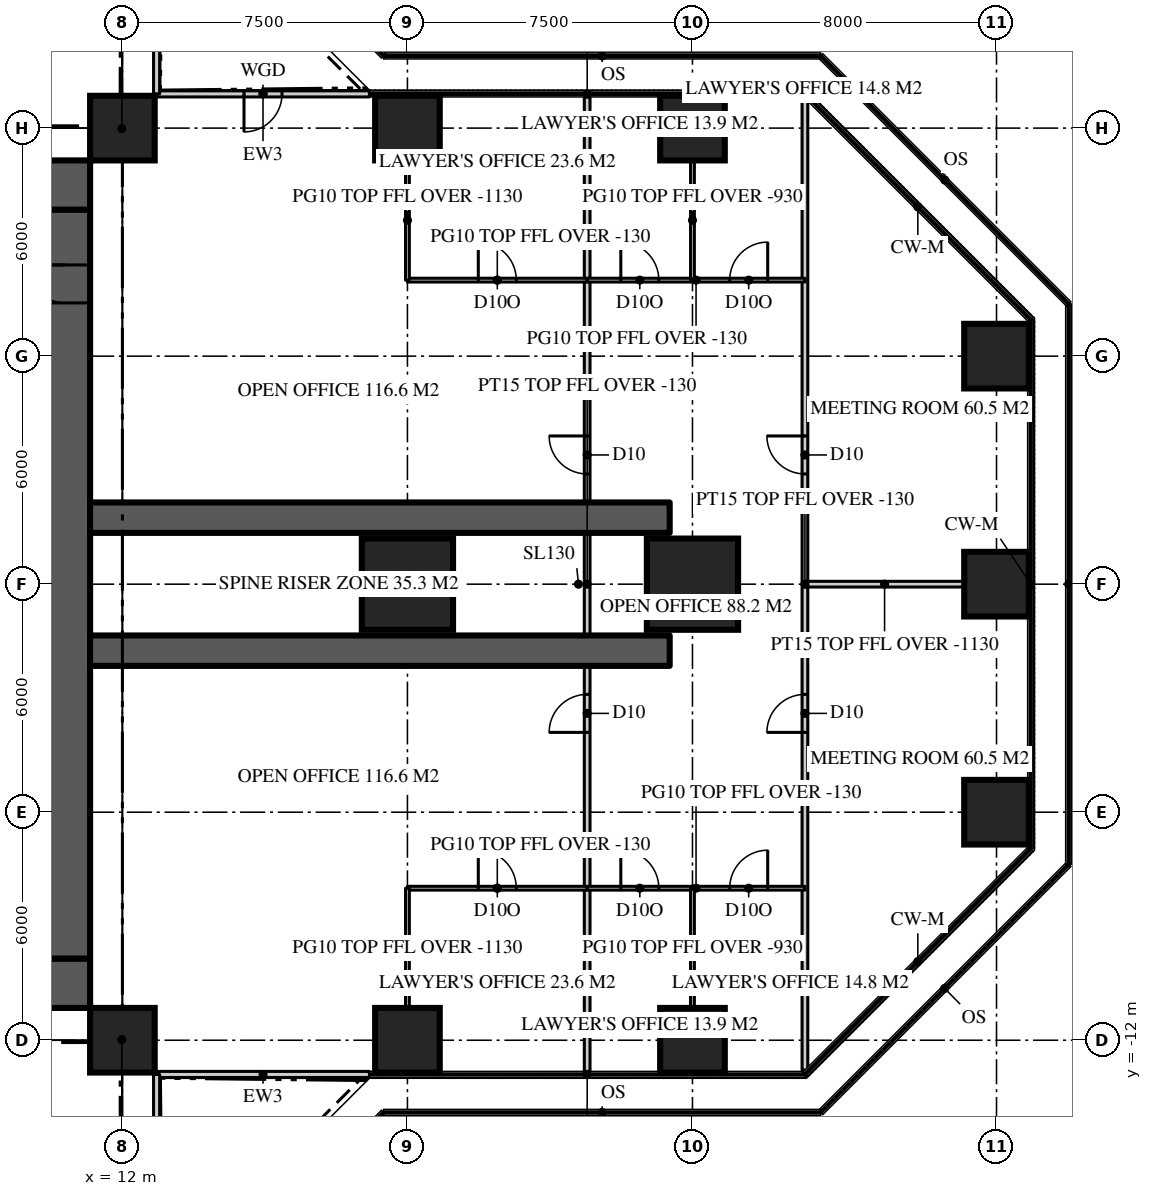
"""IFC4 building model, lengths in metres.
Left out: names, types, materials, properties, quantities, classifications, styles, units other than length and angle.
Written with IfcOpenShell. Run it as: python <this file> out.ifc"""

import sys

from ifc_helpers import new_model, si_unit, direction, frame, frame_2d, origin, origin_2d, place, context, subcontext, project, spatial, rectangle, extrude, element, fill, save


model = new_model("IFC4")
c1 = context("Model", 3, precision=1e-05, world=origin(), true_north=direction((0.0, 1.0)))
c2 = subcontext(c1, "Body", "Model", "MODEL_VIEW")
j1 = project(units=[si_unit("LENGTHUNIT", "METRE"), si_unit("PLANEANGLEUNIT", "RADIAN")], contexts=[c1])
p1 = place(None, origin())
s1 = spatial("IfcSite", under=j1, at=p1, CompositionType="ELEMENT")
p2 = place(p1, origin())
s2 = spatial("IfcBuilding", under=s1, at=p2, CompositionType="ELEMENT")
p3 = place(p2, frame((0.0, 0.0, 135.9)))
s3 = spatial("IfcBuildingStorey", under=s2, at=p3, CompositionType="ELEMENT", Elevation=135.9)
p4 = place(p3, frame((-11.15, 10.5, 0.0), z_axis=(0.0, 0.0, 1.0), x_axis=(1.0, 0.0, 0.0)))
e1 = element("IfcWall", 1, at=p4, inside=s3, PredefinedType="SHEAR", context=c2, shape_type="SweptSolid", body=[
    extrude(rectangle(XDim=22.3, YDim=1.3, at=frame_2d((11.15, 0.0))), origin(), (0.0, 0.0, 1.0), 3.9),
])
p5 = place(p4, frame((4.25, 0.0, 0.0)))
e2 = element("IfcOpeningElement", 2, at=p5, cuts=e1, PredefinedType="OPENING", context=c2, shape_type="SweptSolid", body=[
    extrude(rectangle(XDim=1.8, YDim=2.2, at=frame_2d((0.9, 1.1))), frame((0.0, 0.66, 0.0), z_axis=(0.0, -1.0, 0.0), x_axis=(1.0, 0.0, 0.0)), (0.0, 0.0, 1.0), 1.32),
])
p6 = place(p4, frame((16.25, 0.0, 0.0)))
e3 = element("IfcOpeningElement", 3, at=p6, cuts=e1, PredefinedType="OPENING", context=c2, shape_type="SweptSolid", body=[
    extrude(rectangle(XDim=1.8, YDim=2.2, at=frame_2d((0.9, 1.1))), frame((0.0, 0.66, 0.0), z_axis=(0.0, -1.0, 0.0), x_axis=(1.0, 0.0, 0.0)), (0.0, 0.0, 1.0), 1.32),
])
p7 = place(p3, frame((11.15, -10.5, 0.0), z_axis=(0.0, 0.0, 1.0), x_axis=(-1.0, 0.0, 0.0)))
e4 = element("IfcWall", 4, at=p7, inside=s3, PredefinedType="SHEAR", context=c2, shape_type="SweptSolid", body=[
    extrude(rectangle(XDim=22.3, YDim=1.3, at=frame_2d((11.15, 0.0))), origin(), (0.0, 0.0, 1.0), 3.9),
])
p8 = place(p7, frame((16.25, 0.0, 0.0)))
e5 = element("IfcOpeningElement", 5, at=p8, cuts=e4, PredefinedType="OPENING", context=c2, shape_type="SweptSolid", body=[
    extrude(rectangle(XDim=1.8, YDim=2.2, at=frame_2d((0.9, 1.1))), frame((0.0, 0.66, 0.0), z_axis=(0.0, -1.0, 0.0), x_axis=(1.0, 0.0, 0.0)), (0.0, 0.0, 1.0), 1.32),
])
p9 = place(p7, frame((4.25, 0.0, 0.0)))
e6 = element("IfcOpeningElement", 6, at=p9, cuts=e4, PredefinedType="OPENING", context=c2, shape_type="SweptSolid", body=[
    extrude(rectangle(XDim=1.8, YDim=2.2, at=frame_2d((0.9, 1.1))), frame((0.0, 0.66, 0.0), z_axis=(0.0, -1.0, 0.0), x_axis=(1.0, 0.0, 0.0)), (0.0, 0.0, 1.0), 1.32),
])
p10 = place(p3, frame((10.5, -9.85, 0.0), z_axis=(0.0, 0.0, 1.0), x_axis=(0.0, 1.0, 0.0)))
e7 = element("IfcWall", 7, at=p10, inside=s3, PredefinedType="SHEAR", context=c2, shape_type="SweptSolid", body=[
    extrude(rectangle(XDim=19.7, YDim=1.3, at=frame_2d((9.85, 0.0))), origin(), (0.0, 0.0, 1.0), 3.9),
])
p11 = place(p10, frame((17.25, 0.0, 0.0)))
e8 = element("IfcOpeningElement", 8, at=p11, cuts=e7, PredefinedType="OPENING", context=c2, shape_type="SweptSolid", body=[
    extrude(rectangle(XDim=1.0, YDim=2.2, at=frame_2d((0.5, 1.1))), frame((0.0, 0.66, 0.0), z_axis=(0.0, -1.0, 0.0), x_axis=(1.0, 0.0, 0.0)), (0.0, 0.0, 1.0), 1.32),
])
for number, where, z_axis, x_axis in (
    (9, (11.15, -1.75, 0.0), (0.0, 0.0, 1.0), (1.0, 0.0, 0.0)),
    (10, (11.15, 1.75, 0.0), (0.0, 0.0, 1.0), (1.0, 0.0, 0.0)),
):
    element("IfcWall", number, at=place(p3, frame(where, z_axis=z_axis, x_axis=x_axis)), inside=s3, PredefinedType="SHEAR", context=c2, shape_type="SweptSolid", body=[
        extrude(rectangle(XDim=15.25, YDim=0.8, at=frame_2d((7.625, 0.0))), origin(), (0.0, 0.0, 1.0), 3.9),
    ])
for number, where, z_axis, x_axis in (
    (11, (12.0, -12.0, 0.0), (0.0, 0.0, 1.0), (1.0, 0.0, 0.0)),
    (12, (19.5, -12.0, 0.0), (0.0, 0.0, 1.0), (1.0, 0.0, 0.0)),
    (13, (27.0, -12.0, 0.0), (0.0, 0.0, 1.0), (1.0, 0.0, 0.0)),
    (14, (35.0, -6.0, 0.0), (0.0, 0.0, 1.0), (1.0, 0.0, 0.0)),
):
    element("IfcColumn", number, at=place(p3, frame(where, z_axis=z_axis, x_axis=x_axis)), inside=s3, PredefinedType="COLUMN", context=c2, shape_type="SweptSolid", body=[
        extrude(rectangle(XDim=1.7, YDim=1.7, at=origin_2d()), origin(), (0.0, 0.0, 1.0), 3.9),
    ])
for number, where, z_axis, x_axis in (
    (15, (19.5, 0.0, 0.0), (0.0, 0.0, 1.0), (1.0, 0.0, 0.0)),
    (16, (27.0, 0.0, 0.0), (0.0, 0.0, 1.0), (1.0, 0.0, 0.0)),
):
    element("IfcColumn", number, at=place(p3, frame(where, z_axis=z_axis, x_axis=x_axis)), inside=s3, PredefinedType="COLUMN", context=c2, shape_type="SweptSolid", body=[
        extrude(rectangle(XDim=2.4, YDim=2.4, at=origin_2d()), origin(), (0.0, 0.0, 1.0), 3.9),
    ])
for number, where, z_axis, x_axis in (
    (17, (35.0, 0.0, 0.0), (0.0, 0.0, 1.0), (1.0, 0.0, 0.0)),
    (18, (35.0, 6.0, 0.0), (0.0, 0.0, 1.0), (1.0, 0.0, 0.0)),
    (19, (12.0, 12.0, 0.0), (0.0, 0.0, 1.0), (1.0, 0.0, 0.0)),
    (20, (19.5, 12.0, 0.0), (0.0, 0.0, 1.0), (1.0, 0.0, 0.0)),
    (21, (27.0, 12.0, 0.0), (0.0, 0.0, 1.0), (1.0, 0.0, 0.0)),
):
    element("IfcColumn", number, at=place(p3, frame(where, z_axis=z_axis, x_axis=x_axis)), inside=s3, PredefinedType="COLUMN", context=c2, shape_type="SweptSolid", body=[
        extrude(rectangle(XDim=1.7, YDim=1.7, at=origin_2d()), origin(), (0.0, 0.0, 1.0), 3.9),
    ])
p12 = place(p3, frame((12.9, -12.9, 0.0), z_axis=(0.0, 0.0, 1.0), x_axis=(1.0, 0.0, 0.0)))
e22 = element("IfcWall", 22, at=p12, inside=s3, PredefinedType="SOLIDWALL", context=c2, shape_type="SweptSolid", body=[
    extrude(rectangle(XDim=5.6, YDim=0.16, at=frame_2d((2.8, 0.0))), origin(), (0.0, 0.0, 1.0), 3.77),
])
p13 = place(p3, frame((18.5, 12.9, 0.0), z_axis=(0.0, 0.0, 1.0), x_axis=(-1.0, 0.0, 0.0)))
e23 = element("IfcWall", 23, at=p13, inside=s3, PredefinedType="SOLIDWALL", context=c2, shape_type="SweptSolid", body=[
    extrude(rectangle(XDim=5.6, YDim=0.16, at=frame_2d((2.8, 0.0))), origin(), (0.0, 0.0, 1.0), 3.77),
])
p14 = place(p13, frame((2.3, 0.0, 0.0)))
e24 = element("IfcOpeningElement", 24, at=p14, cuts=e23, PredefinedType="OPENING", context=c2, shape_type="SweptSolid", body=[
    extrude(rectangle(XDim=1.0, YDim=2.2, at=frame_2d((0.5, 1.1))), frame((0.0, 0.09, 0.0), z_axis=(0.0, -1.0, 0.0), x_axis=(1.0, 0.0, 0.0)), (0.0, 0.0, 1.0), 0.18),
])
p15 = place(p3, frame((12.9, 12.9, 0.0), z_axis=(0.0, 0.0, 1.0), x_axis=(0.0, 1.0, 0.0)))
e25 = element("IfcWall", 25, at=p15, inside=s3, PredefinedType="SOLIDWALL", context=c2, shape_type="SweptSolid", body=[
    extrude(rectangle(XDim=5.6, YDim=0.16, at=frame_2d((2.8, 0.0))), origin(), (0.0, 0.0, 1.0), 3.77),
])
p16 = place(p3, frame((12.9, -18.5, 0.0), z_axis=(0.0, 0.0, 1.0), x_axis=(0.0, 1.0, 0.0)))
e26 = element("IfcWall", 26, at=p16, inside=s3, PredefinedType="SOLIDWALL", context=c2, shape_type="SweptSolid", body=[
    extrude(rectangle(XDim=5.6, YDim=0.16, at=frame_2d((2.8, 0.0))), origin(), (0.0, 0.0, 1.0), 3.77),
])
p17 = place(p16, frame((2.3, 0.0, 0.0)))
e27 = element("IfcOpeningElement", 27, at=p17, cuts=e26, PredefinedType="OPENING", context=c2, shape_type="SweptSolid", body=[
    extrude(rectangle(XDim=1.0, YDim=2.2, at=frame_2d((0.5, 1.1))), frame((0.0, 0.09, 0.0), z_axis=(0.0, -1.0, 0.0), x_axis=(1.0, 0.0, 0.0)), (0.0, 0.0, 1.0), 0.18),
])
p18 = place(p3, frame((24.229, -12.82, 0.0), z_axis=(0.0, 0.0, 1.0), x_axis=(0.0, 1.0, 0.0)))
e28 = element("IfcWall", 28, at=p18, inside=s3, PredefinedType="PARTITIONING", context=c2, shape_type="SweptSolid", body=[
    extrude(rectangle(XDim=25.64, YDim=0.15, at=frame_2d((12.82, 0.0))), origin(), (0.0, 0.0, 1.0), 3.77),
])
p19 = place(p18, frame((15.72, 0.0, 0.0)))
e29 = element("IfcOpeningElement", 29, at=p19, cuts=e28, PredefinedType="OPENING", context=c2, shape_type="SweptSolid", body=[
    extrude(rectangle(XDim=1.0, YDim=2.2, at=frame_2d((0.5, 1.1))), frame((0.0, 0.085, 0.0), z_axis=(0.0, -1.0, 0.0), x_axis=(1.0, 0.0, 0.0)), (0.0, 0.0, 1.0), 0.17),
])
p20 = place(p18, frame((8.92, 0.0, 0.0)))
e30 = element("IfcOpeningElement", 30, at=p20, cuts=e28, PredefinedType="OPENING", context=c2, shape_type="SweptSolid", body=[
    extrude(rectangle(XDim=1.0, YDim=2.2, at=frame_2d((0.5, 1.1))), frame((0.0, 0.085, 0.0), z_axis=(0.0, -1.0, 0.0), x_axis=(1.0, 0.0, 0.0)), (0.0, 0.0, 1.0), 0.17),
])
p21 = place(p3, frame((29.959, -12.786, 0.0), z_axis=(0.0, 0.0, 1.0), x_axis=(0.0, 1.0, 0.0)))
e31 = element("IfcWall", 31, at=p21, inside=s3, PredefinedType="PARTITIONING", context=c2, shape_type="SweptSolid", body=[
    extrude(rectangle(XDim=25.573, YDim=0.15, at=frame_2d((12.786, 0.0))), origin(), (0.0, 0.0, 1.0), 3.77),
])
p22 = place(p21, frame((15.687, 0.0, 0.0)))
e32 = element("IfcOpeningElement", 32, at=p22, cuts=e31, PredefinedType="OPENING", context=c2, shape_type="SweptSolid", body=[
    extrude(rectangle(XDim=1.0, YDim=2.2, at=frame_2d((0.5, 1.1))), frame((0.0, 0.085, 0.0), z_axis=(0.0, -1.0, 0.0), x_axis=(1.0, 0.0, 0.0)), (0.0, 0.0, 1.0), 0.17),
])
p23 = place(p21, frame((8.886, 0.0, 0.0)))
e33 = element("IfcOpeningElement", 33, at=p23, cuts=e31, PredefinedType="OPENING", context=c2, shape_type="SweptSolid", body=[
    extrude(rectangle(XDim=1.0, YDim=2.2, at=frame_2d((0.5, 1.1))), frame((0.0, 0.085, 0.0), z_axis=(0.0, -1.0, 0.0), x_axis=(1.0, 0.0, 0.0)), (0.0, 0.0, 1.0), 0.17),
])
p24 = place(p3, frame((29.959, 0.0, 0.0), z_axis=(0.0, 0.0, 1.0), x_axis=(1.0, 0.0, 0.0)))
e34 = element("IfcWall", 34, at=p24, inside=s3, PredefinedType="PARTITIONING", context=c2, shape_type="SweptSolid", body=[
    extrude(rectangle(XDim=4.191, YDim=0.15, at=frame_2d((2.095, 0.0))), origin(), (0.0, 0.0, 1.0), 2.77),
])
p25 = place(p3, frame((19.5, 8.0, 0.0), z_axis=(0.0, 0.0, 1.0), x_axis=(1.0, 0.0, 0.0)))
e35 = element("IfcWall", 35, at=p25, inside=s3, PredefinedType="PARTITIONING", context=c2, shape_type="SweptSolid", body=[
    extrude(rectangle(XDim=4.729, YDim=0.1, at=frame_2d((2.365, 0.0))), origin(), (0.0, 0.0, 1.0), 3.77),
])
p26 = place(p25, frame((1.865, 0.0, 0.0)))
e36 = element("IfcOpeningElement", 36, at=p26, cuts=e35, PredefinedType="OPENING", context=c2, shape_type="SweptSolid", body=[
    extrude(rectangle(XDim=1.0, YDim=2.2, at=frame_2d((0.5, 1.1))), frame((0.0, 0.06, 0.0), z_axis=(0.0, -1.0, 0.0), x_axis=(1.0, 0.0, 0.0)), (0.0, 0.0, 1.0), 0.12),
])
p27 = place(p3, frame((24.229, 8.0, 0.0), z_axis=(0.0, 0.0, 1.0), x_axis=(1.0, 0.0, 0.0)))
e37 = element("IfcWall", 37, at=p27, inside=s3, PredefinedType="PARTITIONING", context=c2, shape_type="SweptSolid", body=[
    extrude(rectangle(XDim=5.73, YDim=0.1, at=frame_2d((2.865, 0.0))), origin(), (0.0, 0.0, 1.0), 3.77),
])
p28 = place(p27, frame((0.885, 0.0, 0.0)))
e38 = element("IfcOpeningElement", 38, at=p28, cuts=e37, PredefinedType="OPENING", context=c2, shape_type="SweptSolid", body=[
    extrude(rectangle(XDim=1.0, YDim=2.2, at=frame_2d((0.5, 1.1))), frame((0.0, 0.06, 0.0), z_axis=(0.0, -1.0, 0.0), x_axis=(1.0, 0.0, 0.0)), (0.0, 0.0, 1.0), 0.12),
])
p29 = place(p27, frame((3.75, 0.0, 0.0)))
e39 = element("IfcOpeningElement", 39, at=p29, cuts=e37, PredefinedType="OPENING", context=c2, shape_type="SweptSolid", body=[
    extrude(rectangle(XDim=1.0, YDim=2.2, at=frame_2d((0.5, 1.1))), frame((0.0, 0.06, 0.0), z_axis=(0.0, -1.0, 0.0), x_axis=(1.0, 0.0, 0.0)), (0.0, 0.0, 1.0), 0.12),
])
p30 = place(p3, frame((19.5, 8.0, 0.0), z_axis=(0.0, 0.0, 1.0), x_axis=(0.0, 1.0, 0.0)))
e40 = element("IfcWall", 40, at=p30, inside=s3, PredefinedType="PARTITIONING", context=c2, shape_type="SweptSolid", body=[
    extrude(rectangle(XDim=3.15, YDim=0.1, at=frame_2d((1.575, 0.0))), origin(), (0.0, 0.0, 1.0), 2.77),
])
p31 = place(p3, frame((27.0, 8.0, 0.0), z_axis=(0.0, 0.0, 1.0), x_axis=(0.0, 1.0, 0.0)))
e41 = element("IfcWall", 41, at=p31, inside=s3, PredefinedType="PARTITIONING", context=c2, shape_type="SweptSolid", body=[
    extrude(rectangle(XDim=3.15, YDim=0.1, at=frame_2d((1.575, 0.0))), origin(), (0.0, 0.0, 1.0), 2.97),
])
p32 = place(p3, frame((19.5, -8.0, 0.0), z_axis=(0.0, 0.0, 1.0), x_axis=(1.0, 0.0, 0.0)))
e42 = element("IfcWall", 42, at=p32, inside=s3, PredefinedType="PARTITIONING", context=c2, shape_type="SweptSolid", body=[
    extrude(rectangle(XDim=4.729, YDim=0.1, at=frame_2d((2.365, 0.0))), origin(), (0.0, 0.0, 1.0), 3.77),
])
p33 = place(p32, frame((1.865, 0.0, 0.0)))
e43 = element("IfcOpeningElement", 43, at=p33, cuts=e42, PredefinedType="OPENING", context=c2, shape_type="SweptSolid", body=[
    extrude(rectangle(XDim=1.0, YDim=2.2, at=frame_2d((0.5, 1.1))), frame((0.0, 0.06, 0.0), z_axis=(0.0, -1.0, 0.0), x_axis=(1.0, 0.0, 0.0)), (0.0, 0.0, 1.0), 0.12),
])
p34 = place(p3, frame((24.229, -8.0, 0.0), z_axis=(0.0, 0.0, 1.0), x_axis=(1.0, 0.0, 0.0)))
e44 = element("IfcWall", 44, at=p34, inside=s3, PredefinedType="PARTITIONING", context=c2, shape_type="SweptSolid", body=[
    extrude(rectangle(XDim=5.73, YDim=0.1, at=frame_2d((2.865, 0.0))), origin(), (0.0, 0.0, 1.0), 3.77),
])
p35 = place(p34, frame((0.885, 0.0, 0.0)))
e45 = element("IfcOpeningElement", 45, at=p35, cuts=e44, PredefinedType="OPENING", context=c2, shape_type="SweptSolid", body=[
    extrude(rectangle(XDim=1.0, YDim=2.2, at=frame_2d((0.5, 1.1))), frame((0.0, 0.06, 0.0), z_axis=(0.0, -1.0, 0.0), x_axis=(1.0, 0.0, 0.0)), (0.0, 0.0, 1.0), 0.12),
])
p36 = place(p34, frame((3.75, 0.0, 0.0)))
e46 = element("IfcOpeningElement", 46, at=p36, cuts=e44, PredefinedType="OPENING", context=c2, shape_type="SweptSolid", body=[
    extrude(rectangle(XDim=1.0, YDim=2.2, at=frame_2d((0.5, 1.1))), frame((0.0, 0.06, 0.0), z_axis=(0.0, -1.0, 0.0), x_axis=(1.0, 0.0, 0.0)), (0.0, 0.0, 1.0), 0.12),
])
p37 = place(p3, frame((19.5, -8.0, 0.0), z_axis=(0.0, 0.0, 1.0), x_axis=(0.0, -1.0, 0.0)))
e47 = element("IfcWall", 47, at=p37, inside=s3, PredefinedType="PARTITIONING", context=c2, shape_type="SweptSolid", body=[
    extrude(rectangle(XDim=3.15, YDim=0.1, at=frame_2d((1.575, 0.0))), origin(), (0.0, 0.0, 1.0), 2.77),
])
p38 = place(p3, frame((27.0, -8.0, 0.0), z_axis=(0.0, 0.0, 1.0), x_axis=(0.0, -1.0, 0.0)))
e48 = element("IfcWall", 48, at=p38, inside=s3, PredefinedType="PARTITIONING", context=c2, shape_type="SweptSolid", body=[
    extrude(rectangle(XDim=3.15, YDim=0.1, at=frame_2d((1.575, 0.0))), origin(), (0.0, 0.0, 1.0), 2.97),
])
for number, where, z_axis, x_axis in (
    (49, (11.15, 11.15, 0.0), (0.0, 0.0, 1.0), (0.707, 0.707, 0.0)),
    (50, (11.15, -11.15, 0.0), (0.0, 0.0, 1.0), (0.707, -0.707, 0.0)),
):
    element("IfcWall", number, at=place(p3, frame(where, z_axis=z_axis, x_axis=x_axis)), inside=s3, PredefinedType="PARTITIONING", context=c2, shape_type="SweptSolid", body=[
        extrude(rectangle(XDim=2.362, YDim=0.15, at=frame_2d((1.181, 0.0))), origin(), (0.0, 0.0, 1.0), 3.22),
    ])
p39 = place(p14, origin())
e51 = element("IfcDoor", 51, at=p39, inside=s3, OperationType="SINGLE_SWING_RIGHT", PredefinedType="DOOR", context=c2, shape_type="SweptSolid", body=[
    extrude(rectangle(XDim=1.0, YDim=2.2, at=frame_2d((0.5, 1.1))), frame((0.0, 0.025, 0.0), z_axis=(0.0, -1.0, 0.0), x_axis=(1.0, 0.0, 0.0)), (0.0, 0.0, 1.0), 0.05),
])
fill(e24, e51)
p40 = place(p11, origin())
e52 = element("IfcDoor", 52, at=p40, inside=s3, OperationType="SINGLE_SWING_RIGHT", PredefinedType="DOOR", context=c2, shape_type="SweptSolid", body=[
    extrude(rectangle(XDim=1.0, YDim=2.2, at=frame_2d((0.5, 1.1))), frame((0.0, 0.025, 0.0), z_axis=(0.0, -1.0, 0.0), x_axis=(1.0, 0.0, 0.0)), (0.0, 0.0, 1.0), 0.05),
])
fill(e8, e52)
p41 = place(p19, origin())
e53 = element("IfcDoor", 53, at=p41, inside=s3, OperationType="SINGLE_SWING_RIGHT", PredefinedType="DOOR", context=c2, shape_type="SweptSolid", body=[
    extrude(rectangle(XDim=1.0, YDim=2.2, at=frame_2d((0.5, 1.1))), frame((0.0, 0.025, 0.0), z_axis=(0.0, -1.0, 0.0), x_axis=(1.0, 0.0, 0.0)), (0.0, 0.0, 1.0), 0.05),
])
fill(e29, e53)
p42 = place(p20, origin())
e54 = element("IfcDoor", 54, at=p42, inside=s3, OperationType="SINGLE_SWING_LEFT", PredefinedType="DOOR", context=c2, shape_type="SweptSolid", body=[
    extrude(rectangle(XDim=1.0, YDim=2.2, at=frame_2d((0.5, 1.1))), frame((0.0, 0.025, 0.0), z_axis=(0.0, -1.0, 0.0), x_axis=(1.0, 0.0, 0.0)), (0.0, 0.0, 1.0), 0.05),
])
fill(e30, e54)
p43 = place(p22, origin())
e55 = element("IfcDoor", 55, at=p43, inside=s3, OperationType="SINGLE_SWING_RIGHT", PredefinedType="DOOR", context=c2, shape_type="SweptSolid", body=[
    extrude(rectangle(XDim=1.0, YDim=2.2, at=frame_2d((0.5, 1.1))), frame((0.0, 0.025, 0.0), z_axis=(0.0, -1.0, 0.0), x_axis=(1.0, 0.0, 0.0)), (0.0, 0.0, 1.0), 0.05),
])
fill(e32, e55)
p44 = place(p23, origin())
e56 = element("IfcDoor", 56, at=p44, inside=s3, OperationType="SINGLE_SWING_LEFT", PredefinedType="DOOR", context=c2, shape_type="SweptSolid", body=[
    extrude(rectangle(XDim=1.0, YDim=2.2, at=frame_2d((0.5, 1.1))), frame((0.0, 0.025, 0.0), z_axis=(0.0, -1.0, 0.0), x_axis=(1.0, 0.0, 0.0)), (0.0, 0.0, 1.0), 0.05),
])
fill(e33, e56)
p45 = place(p26, origin())
e57 = element("IfcDoor", 57, at=p45, inside=s3, OperationType="SINGLE_SWING_LEFT", PredefinedType="DOOR", context=c2, shape_type="SweptSolid", body=[
    extrude(rectangle(XDim=1.0, YDim=2.2, at=frame_2d((0.5, 1.1))), frame((0.0, 0.025, 0.0), z_axis=(0.0, -1.0, 0.0), x_axis=(1.0, 0.0, 0.0)), (0.0, 0.0, 1.0), 0.05),
])
fill(e36, e57)
p46 = place(p28, origin())
e58 = element("IfcDoor", 58, at=p46, inside=s3, OperationType="SINGLE_SWING_LEFT", PredefinedType="DOOR", context=c2, shape_type="SweptSolid", body=[
    extrude(rectangle(XDim=1.0, YDim=2.2, at=frame_2d((0.5, 1.1))), frame((0.0, 0.025, 0.0), z_axis=(0.0, -1.0, 0.0), x_axis=(1.0, 0.0, 0.0)), (0.0, 0.0, 1.0), 0.05),
])
fill(e38, e58)
p47 = place(p29, origin())
e59 = element("IfcDoor", 59, at=p47, inside=s3, OperationType="SINGLE_SWING_RIGHT", PredefinedType="DOOR", context=c2, shape_type="SweptSolid", body=[
    extrude(rectangle(XDim=1.0, YDim=2.2, at=frame_2d((0.5, 1.1))), frame((0.0, 0.025, 0.0), z_axis=(0.0, -1.0, 0.0), x_axis=(1.0, 0.0, 0.0)), (0.0, 0.0, 1.0), 0.05),
])
fill(e39, e59)
p48 = place(p33, origin())
e60 = element("IfcDoor", 60, at=p48, inside=s3, OperationType="SINGLE_SWING_LEFT", PredefinedType="DOOR", context=c2, shape_type="SweptSolid", body=[
    extrude(rectangle(XDim=1.0, YDim=2.2, at=frame_2d((0.5, 1.1))), frame((0.0, 0.025, 0.0), z_axis=(0.0, -1.0, 0.0), x_axis=(1.0, 0.0, 0.0)), (0.0, 0.0, 1.0), 0.05),
])
fill(e43, e60)
p49 = place(p35, origin())
e61 = element("IfcDoor", 61, at=p49, inside=s3, OperationType="SINGLE_SWING_LEFT", PredefinedType="DOOR", context=c2, shape_type="SweptSolid", body=[
    extrude(rectangle(XDim=1.0, YDim=2.2, at=frame_2d((0.5, 1.1))), frame((0.0, 0.025, 0.0), z_axis=(0.0, -1.0, 0.0), x_axis=(1.0, 0.0, 0.0)), (0.0, 0.0, 1.0), 0.05),
])
fill(e45, e61)
p50 = place(p36, origin())
e62 = element("IfcDoor", 62, at=p50, inside=s3, OperationType="SINGLE_SWING_RIGHT", PredefinedType="DOOR", context=c2, shape_type="SweptSolid", body=[
    extrude(rectangle(XDim=1.0, YDim=2.2, at=frame_2d((0.5, 1.1))), frame((0.0, 0.025, 0.0), z_axis=(0.0, -1.0, 0.0), x_axis=(1.0, 0.0, 0.0)), (0.0, 0.0, 1.0), 0.05),
])
fill(e46, e62)
save(model, sys.argv[1])
